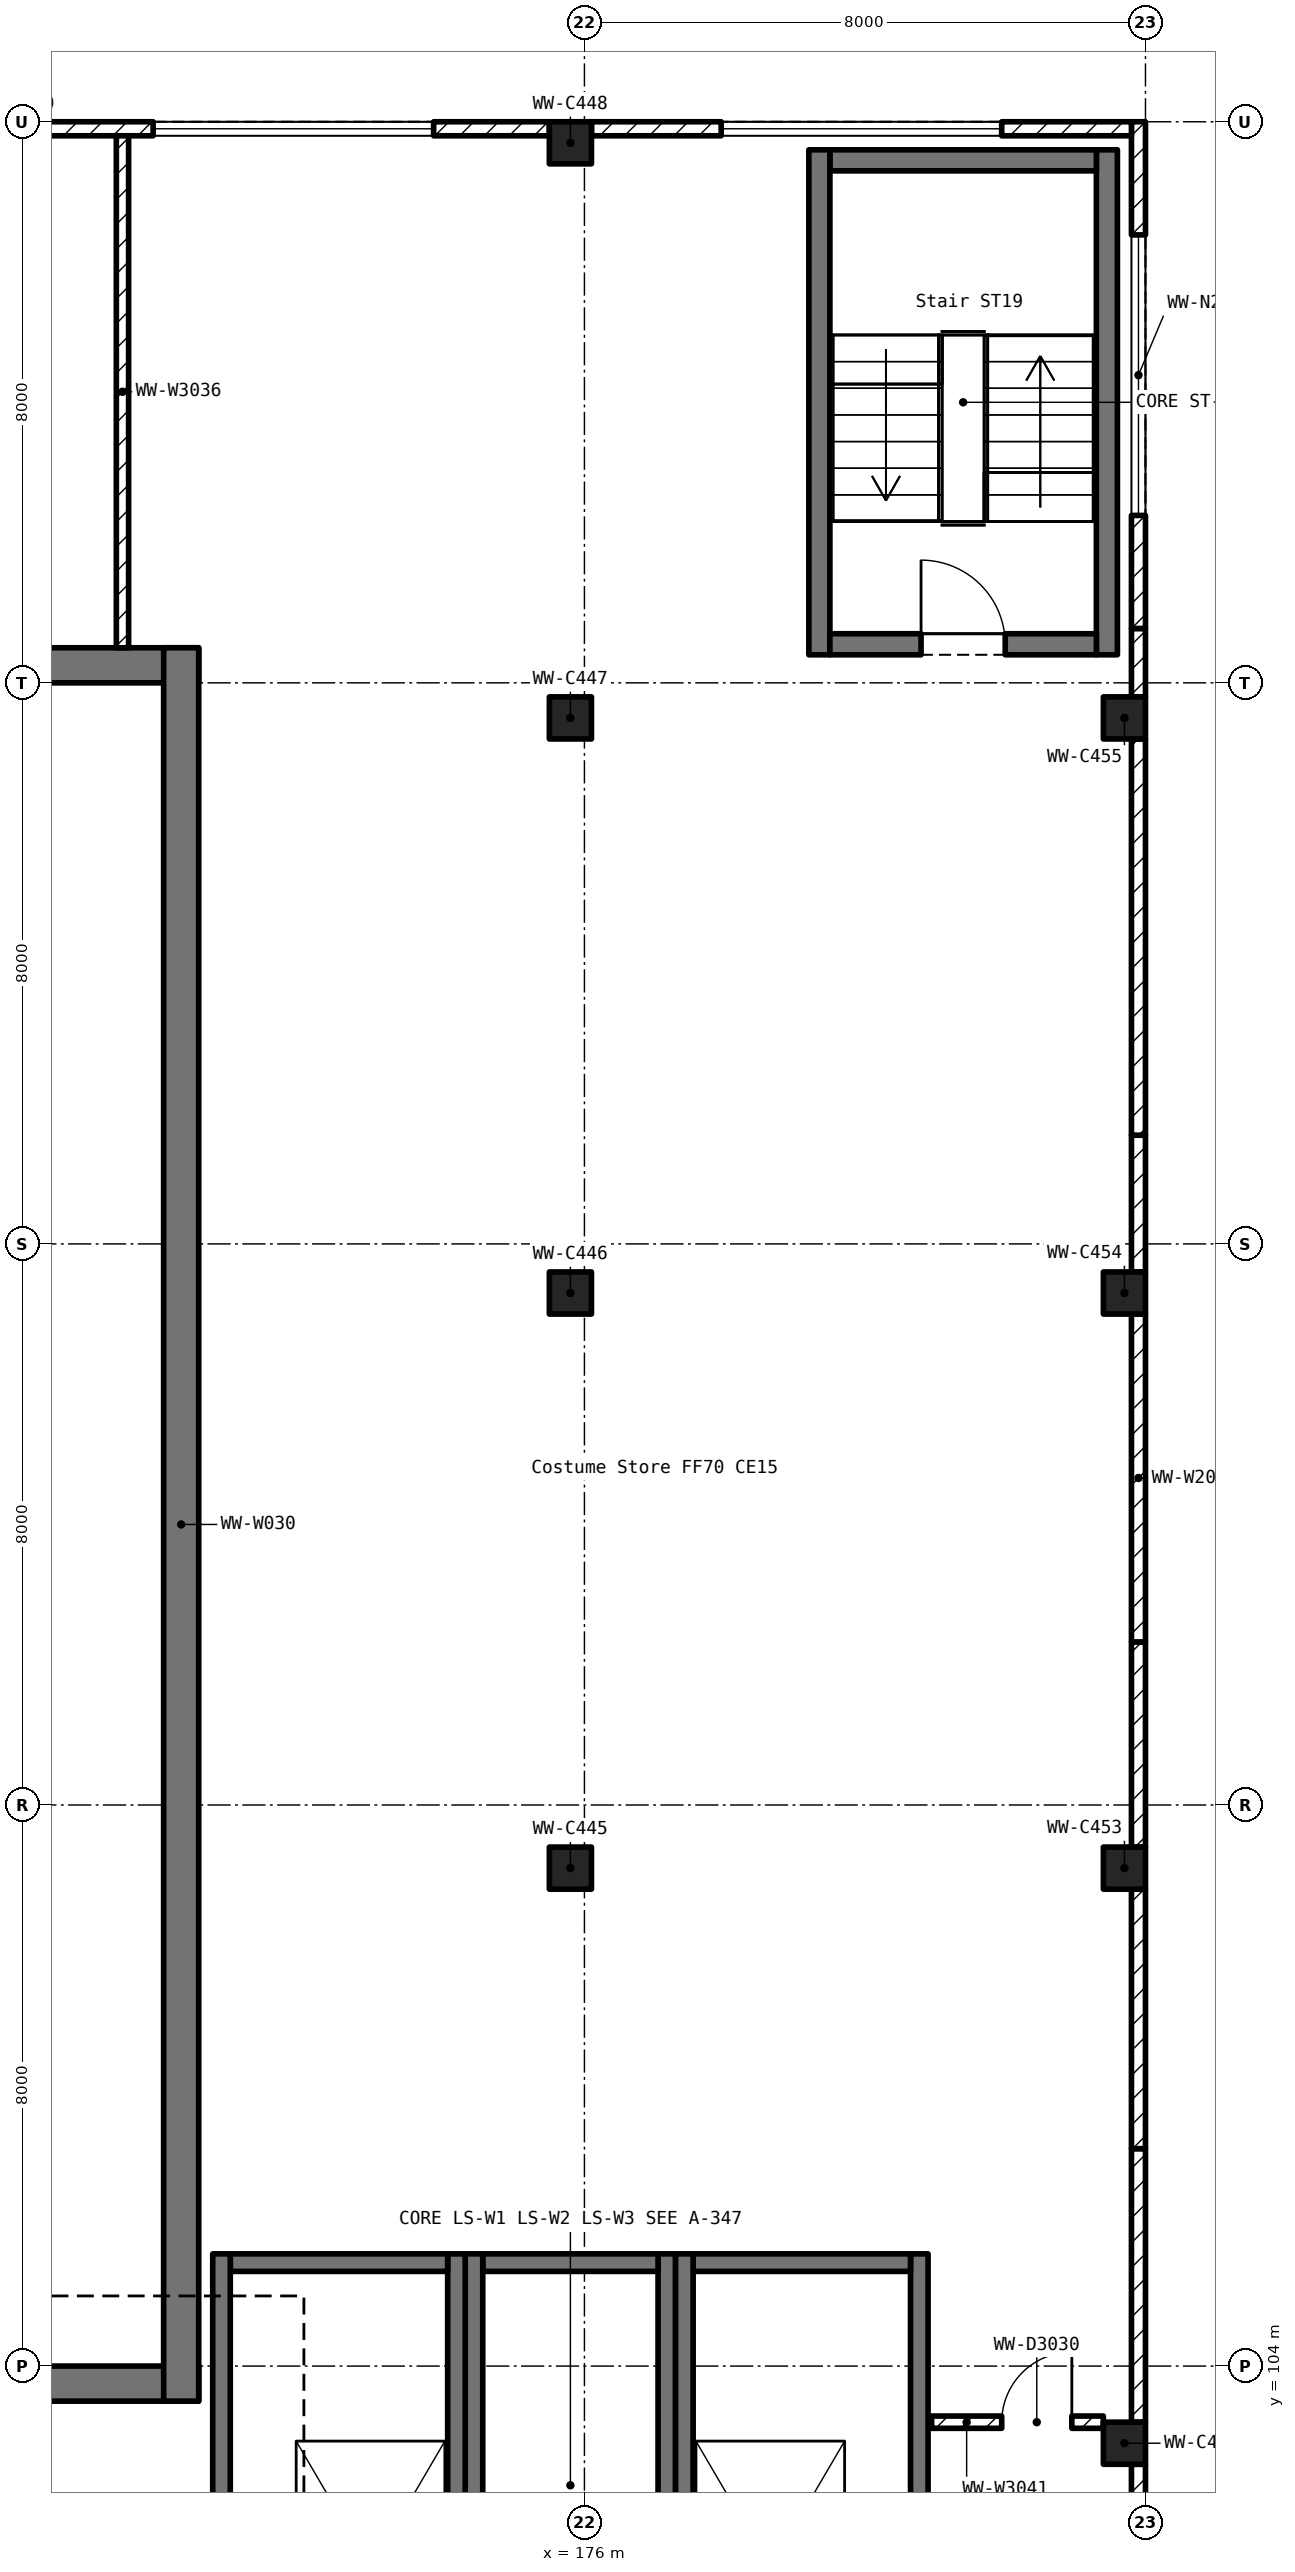
"""IFC4 building model, lengths in metres.
Left out: names, types, materials, properties, quantities, classifications, styles, units other than length and angle.
Written with IfcOpenShell. Run it as: python <this file> out.ifc"""

import sys

from ifc_helpers import new_model, si_unit, direction, frame, frame_2d, origin, origin_2d, place, context, subcontext, project, spatial, rectangle, extrude, element, fill, save


model = new_model("IFC4")
c1 = context("Model", 3, precision=1e-05, world=origin(), true_north=direction((0.0, 1.0)))
c2 = subcontext(c1, "Body", "Model", "MODEL_VIEW")
j1 = project(units=[si_unit("LENGTHUNIT", "METRE"), si_unit("PLANEANGLEUNIT", "RADIAN")], contexts=[c1])
p1 = place(None, origin())
s1 = spatial("IfcSite", under=j1, at=p1, CompositionType="ELEMENT")
p2 = place(p1, origin())
s2 = spatial("IfcBuilding", under=s1, at=p2, CompositionType="ELEMENT")
p3 = place(p2, frame((0.0, 0.0, 6.0)))
s3 = spatial("IfcBuildingStorey", under=s2, at=p3, CompositionType="ELEMENT", Elevation=6.0)
for number, where, z_axis, x_axis in (
    (1, (175.8, 111.1, 0.0), (0.0, 0.0, 1.0), (1.0, 0.0, 0.0)),
    (2, (175.8, 119.3, 0.0), (0.0, 0.0, 1.0), (1.0, 0.0, 0.0)),
    (3, (175.8, 127.5, 0.0), (0.0, 0.0, 1.0), (1.0, 0.0, 0.0)),
    (4, (175.8, 135.7, 0.0), (0.0, 0.0, 1.0), (1.0, 0.0, 0.0)),
    (5, (183.7, 102.9, 0.0), (0.0, 0.0, 1.0), (1.0, 0.0, 0.0)),
    (6, (183.7, 111.1, 0.0), (0.0, 0.0, 1.0), (1.0, 0.0, 0.0)),
    (7, (183.7, 119.3, 0.0), (0.0, 0.0, 1.0), (1.0, 0.0, 0.0)),
    (8, (183.7, 127.5, 0.0), (0.0, 0.0, 1.0), (1.0, 0.0, 0.0)),
):
    element("IfcColumn", number, at=place(p3, frame(where, z_axis=z_axis, x_axis=x_axis)), inside=s3, PredefinedType="COLUMN", context=c2, shape_type="SweptSolid", body=[
        extrude(rectangle(XDim=0.6, YDim=0.6, at=origin_2d()), origin(), (0.0, 0.0, 1.0), 5.5),
    ])
for number, where, z_axis, x_axis in (
    (9, (143.5, 103.75, 0.0), (0.0, 0.0, 1.0), (1.0, 0.0, 0.0)),
    (10, (143.5, 128.25, 0.0), (0.0, 0.0, 1.0), (1.0, 0.0, 0.0)),
):
    element("IfcWall", number, at=place(p3, frame(where, z_axis=z_axis, x_axis=x_axis)), inside=s3, PredefinedType="SHEAR", context=c2, shape_type="SweptSolid", body=[
        extrude(rectangle(XDim=27.0, YDim=0.5, at=frame_2d((13.5, 0.0))), origin(), (0.0, 0.0, 1.0), 5.5),
    ])
p4 = place(p3, frame((170.25, 103.5, 0.0), z_axis=(0.0, 0.0, 1.0), x_axis=(0.0, 1.0, 0.0)))
e11 = element("IfcWall", 11, at=p4, inside=s3, PredefinedType="SHEAR", context=c2, shape_type="SweptSolid", body=[
    extrude(rectangle(XDim=25.0, YDim=0.5, at=frame_2d((12.5, 0.0))), origin(), (0.0, 0.0, 1.0), 5.5),
])
p5 = place(p3, frame((183.9, 99.875, 0.0), z_axis=(0.0, 0.0, 1.0), x_axis=(0.0, 1.0, 0.0)))
e12 = element("IfcWall", 12, at=p5, inside=s3, PredefinedType="SOLIDWALL", context=c2, shape_type="SweptSolid", body=[
    extrude(rectangle(XDim=2.725, YDim=0.2, at=frame_2d((1.363, 0.0))), origin(), (0.0, 0.0, 1.0), 4.55),
])
p6 = place(p3, frame((183.9, 103.2, 0.0), z_axis=(0.0, 0.0, 1.0), x_axis=(0.0, 1.0, 0.0)))
e13 = element("IfcWall", 13, at=p6, inside=s3, PredefinedType="SOLIDWALL", context=c2, shape_type="SweptSolid", body=[
    extrude(rectangle(XDim=3.9, YDim=0.2, at=frame_2d((1.95, 0.0))), origin(), (0.0, 0.0, 1.0), 4.55),
])
p7 = place(p3, frame((183.9, 107.1, 0.0), z_axis=(0.0, 0.0, 1.0), x_axis=(0.0, 1.0, 0.0)))
e14 = element("IfcWall", 14, at=p7, inside=s3, PredefinedType="SOLIDWALL", context=c2, shape_type="SweptSolid", body=[
    extrude(rectangle(XDim=3.7, YDim=0.2, at=frame_2d((1.85, 0.0))), origin(), (0.0, 0.0, 1.0), 4.55),
])
p8 = place(p3, frame((183.9, 111.4, 0.0), z_axis=(0.0, 0.0, 1.0), x_axis=(0.0, 1.0, 0.0)))
e15 = element("IfcWall", 15, at=p8, inside=s3, PredefinedType="SOLIDWALL", context=c2, shape_type="SweptSolid", body=[
    extrude(rectangle(XDim=2.925, YDim=0.2, at=frame_2d((1.462, 0.0))), origin(), (0.0, 0.0, 1.0), 4.55),
])
p9 = place(p3, frame((183.9, 114.325, 0.0), z_axis=(0.0, 0.0, 1.0), x_axis=(0.0, 1.0, 0.0)))
e16 = element("IfcWall", 16, at=p9, inside=s3, PredefinedType="SOLIDWALL", context=c2, shape_type="SweptSolid", body=[
    extrude(rectangle(XDim=4.675, YDim=0.2, at=frame_2d((2.337, 0.0))), origin(), (0.0, 0.0, 1.0), 4.55),
])
p10 = place(p3, frame((183.9, 119.6, 0.0), z_axis=(0.0, 0.0, 1.0), x_axis=(0.0, 1.0, 0.0)))
e17 = element("IfcWall", 17, at=p10, inside=s3, PredefinedType="SOLIDWALL", context=c2, shape_type="SweptSolid", body=[
    extrude(rectangle(XDim=1.95, YDim=0.2, at=frame_2d((0.975, 0.0))), origin(), (0.0, 0.0, 1.0), 4.55),
])
p11 = place(p3, frame((183.9, 121.55, 0.0), z_axis=(0.0, 0.0, 1.0), x_axis=(0.0, 1.0, 0.0)))
e18 = element("IfcWall", 18, at=p11, inside=s3, PredefinedType="SOLIDWALL", context=c2, shape_type="SweptSolid", body=[
    extrude(rectangle(XDim=5.65, YDim=0.2, at=frame_2d((2.825, 0.0))), origin(), (0.0, 0.0, 1.0), 4.55),
])
p12 = place(p3, frame((183.9, 127.8, 0.0), z_axis=(0.0, 0.0, 1.0), x_axis=(0.0, 1.0, 0.0)))
e19 = element("IfcWall", 19, at=p12, inside=s3, PredefinedType="SOLIDWALL", context=c2, shape_type="SweptSolid", body=[
    extrude(rectangle(XDim=0.975, YDim=0.2, at=frame_2d((0.487, 0.0))), origin(), (0.0, 0.0, 1.0), 4.55),
])
p13 = place(p3, frame((183.9, 128.775, 0.0), z_axis=(0.0, 0.0, 1.0), x_axis=(0.0, 1.0, 0.0)))
e20 = element("IfcWall", 20, at=p13, inside=s3, PredefinedType="SOLIDWALL", context=c2, shape_type="SweptSolid", body=[
    extrude(rectangle(XDim=7.225, YDim=0.2, at=frame_2d((3.613, 0.0))), origin(), (0.0, 0.0, 1.0), 4.55),
])
p14 = place(p13, frame((1.612, 0.0, 1.0)))
e21 = element("IfcOpeningElement", 21, at=p14, cuts=e20, PredefinedType="OPENING", context=c2, shape_type="SweptSolid", body=[
    extrude(rectangle(XDim=4.0, YDim=1.8, at=frame_2d((2.0, 0.9))), frame((0.0, 0.112, 0.0), z_axis=(0.0, -1.0, 0.0), x_axis=(1.0, 0.0, 0.0)), (0.0, 0.0, 1.0), 0.224),
])
p15 = place(p3, frame((183.8, 135.9, 0.0), z_axis=(0.0, 0.0, 1.0), x_axis=(-1.0, 0.0, 0.0)))
e22 = element("IfcWall", 22, at=p15, inside=s3, PredefinedType="SOLIDWALL", context=c2, shape_type="SweptSolid", body=[
    extrude(rectangle(XDim=7.7, YDim=0.2, at=frame_2d((3.85, 0.0))), origin(), (0.0, 0.0, 1.0), 4.55),
])
p16 = place(p15, frame((1.85, 0.0, 1.0)))
e23 = element("IfcOpeningElement", 23, at=p16, cuts=e22, PredefinedType="OPENING", context=c2, shape_type="SweptSolid", body=[
    extrude(rectangle(XDim=4.0, YDim=1.8, at=frame_2d((2.0, 0.9))), frame((0.0, 0.112, 0.0), z_axis=(0.0, -1.0, 0.0), x_axis=(1.0, 0.0, 0.0)), (0.0, 0.0, 1.0), 0.224),
])
p17 = place(p3, frame((175.5, 135.9, 0.0), z_axis=(0.0, 0.0, 1.0), x_axis=(-1.0, 0.0, 0.0)))
e24 = element("IfcWall", 24, at=p17, inside=s3, PredefinedType="SOLIDWALL", context=c2, shape_type="SweptSolid", body=[
    extrude(rectangle(XDim=7.3, YDim=0.2, at=frame_2d((3.65, 0.0))), origin(), (0.0, 0.0, 1.0), 4.55),
])
p18 = place(p17, frame((1.65, 0.0, 1.0)))
e25 = element("IfcOpeningElement", 25, at=p18, cuts=e24, PredefinedType="OPENING", context=c2, shape_type="SweptSolid", body=[
    extrude(rectangle(XDim=4.0, YDim=1.8, at=frame_2d((2.0, 0.9))), frame((0.0, 0.112, 0.0), z_axis=(0.0, -1.0, 0.0), x_axis=(1.0, 0.0, 0.0)), (0.0, 0.0, 1.0), 0.224),
])
p19 = place(p3, frame((183.45, 128.4, 0.0), z_axis=(0.0, 0.0, 1.0), x_axis=(0.0, 1.0, 0.0)))
e26 = element("IfcWall", 26, at=p19, inside=s3, PredefinedType="SOLIDWALL", context=c2, shape_type="SweptSolid", body=[
    extrude(rectangle(XDim=7.2, YDim=0.3, at=frame_2d((3.6, 0.0))), origin(), (0.0, 0.0, 1.0), 5.5),
])
p20 = place(p3, frame((183.3, 135.45, 0.0), z_axis=(0.0, 0.0, 1.0), x_axis=(-1.0, 0.0, 0.0)))
e27 = element("IfcWall", 27, at=p20, inside=s3, PredefinedType="SOLIDWALL", context=c2, shape_type="SweptSolid", body=[
    extrude(rectangle(XDim=3.8, YDim=0.3, at=frame_2d((1.9, 0.0))), origin(), (0.0, 0.0, 1.0), 5.5),
])
p21 = place(p3, frame((179.35, 135.6, 0.0), z_axis=(0.0, 0.0, 1.0), x_axis=(0.0, -1.0, 0.0)))
e28 = element("IfcWall", 28, at=p21, inside=s3, PredefinedType="SOLIDWALL", context=c2, shape_type="SweptSolid", body=[
    extrude(rectangle(XDim=7.2, YDim=0.3, at=frame_2d((3.6, 0.0))), origin(), (0.0, 0.0, 1.0), 5.5),
])
p22 = place(p3, frame((179.5, 128.55, 0.0), z_axis=(0.0, 0.0, 1.0), x_axis=(1.0, 0.0, 0.0)))
e29 = element("IfcWall", 29, at=p22, inside=s3, PredefinedType="SOLIDWALL", context=c2, shape_type="SweptSolid", body=[
    extrude(rectangle(XDim=3.8, YDim=0.3, at=frame_2d((1.9, 0.0))), origin(), (0.0, 0.0, 1.0), 5.5),
])
p23 = place(p22, frame((1.3, 0.0, 0.0)))
e30 = element("IfcOpeningElement", 30, at=p23, cuts=e29, PredefinedType="OPENING", context=c2, shape_type="SweptSolid", body=[
    extrude(rectangle(XDim=1.2, YDim=2.1, at=frame_2d((0.6, 1.05))), frame((0.0, 0.162, 0.0), z_axis=(0.0, -1.0, 0.0), x_axis=(1.0, 0.0, 0.0)), (0.0, 0.0, 1.0), 0.324),
])
p24 = place(p3, frame((177.175, 99.0, 0.0), z_axis=(0.0, 0.0, 1.0), x_axis=(0.0, 1.0, 0.0)))
e31 = element("IfcWall", 31, at=p24, inside=s3, PredefinedType="SOLIDWALL", context=c2, shape_type="SweptSolid", body=[
    extrude(rectangle(XDim=6.6, YDim=0.25, at=frame_2d((3.3, 0.0))), origin(), (0.0, 0.0, 1.0), 5.5),
])
p25 = place(p3, frame((177.05, 105.475, 0.0), z_axis=(0.0, 0.0, 1.0), x_axis=(-1.0, 0.0, 0.0)))
e32 = element("IfcWall", 32, at=p25, inside=s3, PredefinedType="SOLIDWALL", context=c2, shape_type="SweptSolid", body=[
    extrude(rectangle(XDim=2.5, YDim=0.25, at=frame_2d((1.25, 0.0))), origin(), (0.0, 0.0, 1.0), 5.5),
])
for number, where, z_axis, x_axis in (
    (33, (174.425, 105.6, 0.0), (0.0, 0.0, 1.0), (0.0, -1.0, 0.0)),
    (34, (174.175, 99.0, 0.0), (0.0, 0.0, 1.0), (0.0, 1.0, 0.0)),
):
    element("IfcWall", number, at=place(p3, frame(where, z_axis=z_axis, x_axis=x_axis)), inside=s3, PredefinedType="SOLIDWALL", context=c2, shape_type="SweptSolid", body=[
        extrude(rectangle(XDim=6.6, YDim=0.25, at=frame_2d((3.3, 0.0))), origin(), (0.0, 0.0, 1.0), 5.5),
    ])
p26 = place(p3, frame((174.05, 105.475, 0.0), z_axis=(0.0, 0.0, 1.0), x_axis=(-1.0, 0.0, 0.0)))
e35 = element("IfcWall", 35, at=p26, inside=s3, PredefinedType="SOLIDWALL", context=c2, shape_type="SweptSolid", body=[
    extrude(rectangle(XDim=3.1, YDim=0.25, at=frame_2d((1.55, 0.0))), origin(), (0.0, 0.0, 1.0), 5.5),
])
for number, where, z_axis, x_axis in (
    (36, (170.825, 105.6, 0.0), (0.0, 0.0, 1.0), (0.0, -1.0, 0.0)),
    (37, (180.775, 99.0, 0.0), (0.0, 0.0, 1.0), (0.0, 1.0, 0.0)),
):
    element("IfcWall", number, at=place(p3, frame(where, z_axis=z_axis, x_axis=x_axis)), inside=s3, PredefinedType="SOLIDWALL", context=c2, shape_type="SweptSolid", body=[
        extrude(rectangle(XDim=6.6, YDim=0.25, at=frame_2d((3.3, 0.0))), origin(), (0.0, 0.0, 1.0), 5.5),
    ])
p27 = place(p3, frame((180.65, 105.475, 0.0), z_axis=(0.0, 0.0, 1.0), x_axis=(-1.0, 0.0, 0.0)))
e38 = element("IfcWall", 38, at=p27, inside=s3, PredefinedType="SOLIDWALL", context=c2, shape_type="SweptSolid", body=[
    extrude(rectangle(XDim=3.1, YDim=0.25, at=frame_2d((1.55, 0.0))), origin(), (0.0, 0.0, 1.0), 5.5),
])
p28 = place(p3, frame((177.425, 105.6, 0.0), z_axis=(0.0, 0.0, 1.0), x_axis=(0.0, -1.0, 0.0)))
e39 = element("IfcWall", 39, at=p28, inside=s3, PredefinedType="SOLIDWALL", context=c2, shape_type="SweptSolid", body=[
    extrude(rectangle(XDim=6.6, YDim=0.25, at=frame_2d((3.3, 0.0))), origin(), (0.0, 0.0, 1.0), 5.5),
])
p29 = place(p3, frame((169.413, 128.5, 0.0), z_axis=(0.0, 0.0, 1.0), x_axis=(0.0, 1.0, 0.0)))
e40 = element("IfcWall", 40, at=p29, inside=s3, PredefinedType="PARTITIONING", context=c2, shape_type="SweptSolid", body=[
    extrude(rectangle(XDim=7.3, YDim=0.175, at=frame_2d((3.65, 0.0))), origin(), (0.0, 0.0, 1.0), 4.45),
])
p30 = place(p3, frame((180.95, 103.2, 0.0), z_axis=(0.0, 0.0, 1.0), x_axis=(1.0, 0.0, 0.0)))
e41 = element("IfcWall", 41, at=p30, inside=s3, PredefinedType="PARTITIONING", context=c2, shape_type="SweptSolid", body=[
    extrude(rectangle(XDim=2.449, YDim=0.175, at=frame_2d((1.225, 0.0))), origin(), (0.0, 0.0, 1.0), 4.45),
])
p31 = place(p30, frame((1.0, 0.0, 0.0)))
e42 = element("IfcOpeningElement", 42, at=p31, cuts=e41, PredefinedType="OPENING", context=c2, shape_type="SweptSolid", body=[
    extrude(rectangle(XDim=1.0, YDim=2.1, at=frame_2d((0.5, 1.05))), frame((0.0, 0.1, 0.0), z_axis=(0.0, -1.0, 0.0), x_axis=(1.0, 0.0, 0.0)), (0.0, 0.0, 1.0), 0.199),
])
p32 = place(p14, origin())
e43 = element("IfcWindow", 43, at=p32, inside=s3, PartitioningType="DOUBLE_PANEL_VERTICAL", PredefinedType="WINDOW", context=c2, shape_type="SweptSolid", body=[
    extrude(rectangle(XDim=4.0, YDim=1.8, at=frame_2d((2.0, 0.9))), frame((0.0, 0.03, 0.0), z_axis=(0.0, -1.0, 0.0), x_axis=(1.0, 0.0, 0.0)), (0.0, 0.0, 1.0), 0.06),
])
fill(e21, e43)
p33 = place(p16, origin())
e44 = element("IfcWindow", 44, at=p33, inside=s3, PartitioningType="DOUBLE_PANEL_VERTICAL", PredefinedType="WINDOW", context=c2, shape_type="SweptSolid", body=[
    extrude(rectangle(XDim=4.0, YDim=1.8, at=frame_2d((2.0, 0.9))), frame((0.0, 0.03, 0.0), z_axis=(0.0, -1.0, 0.0), x_axis=(1.0, 0.0, 0.0)), (0.0, 0.0, 1.0), 0.06),
])
fill(e23, e44)
p34 = place(p18, origin())
e45 = element("IfcWindow", 45, at=p34, inside=s3, PartitioningType="DOUBLE_PANEL_VERTICAL", PredefinedType="WINDOW", context=c2, shape_type="SweptSolid", body=[
    extrude(rectangle(XDim=4.0, YDim=1.8, at=frame_2d((2.0, 0.9))), frame((0.0, 0.03, 0.0), z_axis=(0.0, -1.0, 0.0), x_axis=(1.0, 0.0, 0.0)), (0.0, 0.0, 1.0), 0.06),
])
fill(e25, e45)
p35 = place(p23, origin())
e46 = element("IfcDoor", 46, at=p35, inside=s3, OperationType="SINGLE_SWING_LEFT", PredefinedType="DOOR", context=c2, shape_type="SweptSolid", body=[
    extrude(rectangle(XDim=1.2, YDim=2.1, at=frame_2d((0.6, 1.05))), frame((0.0, 0.025, 0.0), z_axis=(0.0, -1.0, 0.0), x_axis=(1.0, 0.0, 0.0)), (0.0, 0.0, 1.0), 0.05),
])
fill(e30, e46)
p36 = place(p31, origin())
e47 = element("IfcDoor", 47, at=p36, inside=s3, OperationType="SINGLE_SWING_RIGHT", PredefinedType="DOOR", context=c2, shape_type="SweptSolid", body=[
    extrude(rectangle(XDim=1.0, YDim=2.1, at=frame_2d((0.5, 1.05))), frame((0.0, 0.025, 0.0), z_axis=(0.0, -1.0, 0.0), x_axis=(1.0, 0.0, 0.0)), (0.0, 0.0, 1.0), 0.05),
])
fill(e42, e47)
save(model, sys.argv[1])
